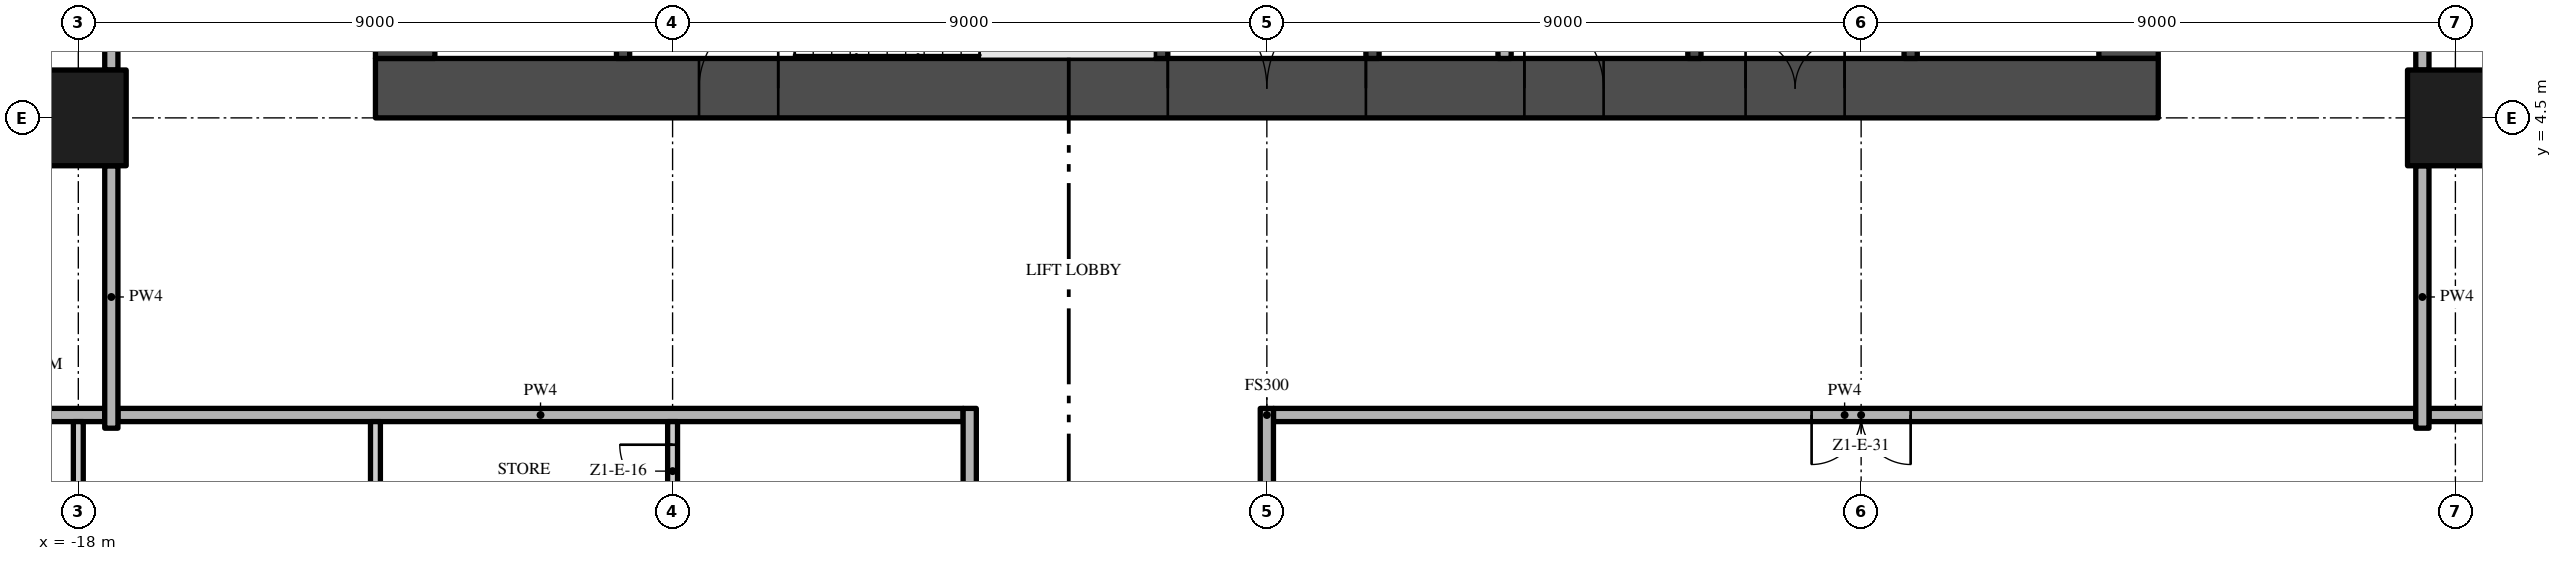
"""IFC4 building model, lengths in metres.
Left out: names, types, materials, properties, quantities, classifications, styles, units other than length and angle.
Written with IfcOpenShell. Run it as: python <this file> out.ifc"""

import sys

from ifc_helpers import new_model, si_unit, direction, frame, frame_2d, origin, origin_2d, place, context, subcontext, project, spatial, rectangle, extrude, element, fill, save


model = new_model("IFC4")
c1 = context("Model", 3, precision=1e-05, world=origin(), true_north=direction((0.0, 1.0)))
c2 = subcontext(c1, "Body", "Model", "MODEL_VIEW")
j1 = project(units=[si_unit("LENGTHUNIT", "METRE"), si_unit("PLANEANGLEUNIT", "RADIAN")], contexts=[c1])
p1 = place(None, origin())
s1 = spatial("IfcSite", under=j1, at=p1, CompositionType="ELEMENT")
p2 = place(p1, origin())
s2 = spatial("IfcBuilding", under=s1, at=p2, CompositionType="ELEMENT")
p3 = place(p2, frame((0.0, 0.0, 60.6)))
s3 = spatial("IfcBuildingStorey", under=s2, at=p3, CompositionType="ELEMENT", Elevation=60.6)
p4 = place(p3, frame((-13.5, 4.95, -0.3), z_axis=(0.0, 0.0, 1.0), x_axis=(1.0, 0.0, 0.0)))
e1 = element("IfcWall", 1, at=p4, inside=s3, PredefinedType="SHEAR", context=c2, shape_type="SweptSolid", body=[
    extrude(rectangle(XDim=27.0, YDim=0.9, at=frame_2d((13.5, 0.0))), origin(), (0.0, 0.0, 1.0), 3.8),
])
p5 = place(p4, frame((12.0, 0.0, 0.3)))
e2 = element("IfcOpeningElement", 2, at=p5, cuts=e1, PredefinedType="OPENING", context=c2, shape_type="SweptSolid", body=[
    extrude(rectangle(XDim=3.0, YDim=2.4, at=frame_2d((1.5, 1.2))), frame((0.0, 0.46, 0.0), z_axis=(0.0, -1.0, 0.0), x_axis=(1.0, 0.0, 0.0)), (0.0, 0.0, 1.0), 0.92),
])
p6 = place(p4, frame((4.9, 0.0, 0.3)))
e3 = element("IfcOpeningElement", 3, at=p6, cuts=e1, PredefinedType="OPENING", context=c2, shape_type="SweptSolid", body=[
    extrude(rectangle(XDim=1.2, YDim=2.2, at=frame_2d((0.6, 1.1))), frame((0.0, 0.46, 0.0), z_axis=(0.0, -1.0, 0.0), x_axis=(1.0, 0.0, 0.0)), (0.0, 0.0, 1.0), 0.92),
])
p7 = place(p4, frame((20.75, 0.0, 0.3)))
e4 = element("IfcOpeningElement", 4, at=p7, cuts=e1, PredefinedType="OPENING", context=c2, shape_type="SweptSolid", body=[
    extrude(rectangle(XDim=1.5, YDim=2.2, at=frame_2d((0.75, 1.1))), frame((0.0, 0.46, 0.0), z_axis=(0.0, -1.0, 0.0), x_axis=(1.0, 0.0, 0.0)), (0.0, 0.0, 1.0), 0.92),
])
p8 = place(p4, frame((17.4, 0.0, 0.3)))
e5 = element("IfcOpeningElement", 5, at=p8, cuts=e1, PredefinedType="OPENING", context=c2, shape_type="SweptSolid", body=[
    extrude(rectangle(XDim=1.2, YDim=2.2, at=frame_2d((0.6, 1.1))), frame((0.0, 0.46, 0.0), z_axis=(0.0, -1.0, 0.0), x_axis=(1.0, 0.0, 0.0)), (0.0, 0.0, 1.0), 0.92),
])
p9 = place(p3, frame((13.05, 5.4, -0.3), z_axis=(0.0, 0.0, 1.0), x_axis=(0.0, 1.0, 0.0)))
e6 = element("IfcWall", 6, at=p9, inside=s3, PredefinedType="SHEAR", context=c2, shape_type="SweptSolid", body=[
    extrude(rectangle(XDim=16.2, YDim=0.9, at=frame_2d((8.1, 0.0))), origin(), (0.0, 0.0, 1.0), 3.8),
])
p10 = place(p9, frame((6.0, 0.0, 0.3)))
e7 = element("IfcOpeningElement", 7, at=p10, cuts=e6, PredefinedType="OPENING", context=c2, shape_type="SweptSolid", body=[
    extrude(rectangle(XDim=1.2, YDim=2.2, at=frame_2d((0.6, 1.1))), frame((0.0, 0.46, 0.0), z_axis=(0.0, -1.0, 0.0), x_axis=(1.0, 0.0, 0.0)), (0.0, 0.0, 1.0), 0.92),
])
p11 = place(p3, frame((-13.05, 21.6, -0.3), z_axis=(0.0, 0.0, 1.0), x_axis=(0.0, -1.0, 0.0)))
e8 = element("IfcWall", 8, at=p11, inside=s3, PredefinedType="SHEAR", context=c2, shape_type="SweptSolid", body=[
    extrude(rectangle(XDim=16.2, YDim=0.9, at=frame_2d((8.1, 0.0))), origin(), (0.0, 0.0, 1.0), 3.8),
])
p12 = place(p11, frame((9.0, 0.0, 0.3)))
e9 = element("IfcOpeningElement", 9, at=p12, cuts=e8, PredefinedType="OPENING", context=c2, shape_type="SweptSolid", body=[
    extrude(rectangle(XDim=1.2, YDim=2.2, at=frame_2d((0.6, 1.1))), frame((0.0, 0.46, 0.0), z_axis=(0.0, -1.0, 0.0), x_axis=(1.0, 0.0, 0.0)), (0.0, 0.0, 1.0), 0.92),
])
for number, where, z_axis, x_axis in (
    (10, (-18.0, 4.5, 0.0), (0.0, 0.0, 1.0), (1.0, 0.0, 0.0)),
    (11, (18.0, 4.5, 0.0), (0.0, 0.0, 1.0), (1.0, 0.0, 0.0)),
):
    element("IfcColumn", number, at=place(p3, frame(where, z_axis=z_axis, x_axis=x_axis)), inside=s3, PredefinedType="COLUMN", context=c2, shape_type="SweptSolid", body=[
        extrude(rectangle(XDim=1.45, YDim=1.45, at=origin_2d()), origin(), (0.0, 0.0, 1.0), 3.5),
    ])
for number, where, z_axis, x_axis in (
    (12, (-9.75, 5.4, 0.0), (0.0, 0.0, 1.0), (0.0, 1.0, 0.0)),
    (13, (-1.6, 5.4, 0.0), (0.0, 0.0, 1.0), (0.0, 1.0, 0.0)),
):
    element("IfcWall", number, at=place(p3, frame(where, z_axis=z_axis, x_axis=x_axis)), inside=s3, PredefinedType="SHEAR", context=c2, shape_type="SweptSolid", body=[
        extrude(rectangle(XDim=2.55, YDim=0.2, at=frame_2d((1.275, 0.0))), origin(), (0.0, 0.0, 1.0), 3.5),
    ])
p13 = place(p3, frame((1.6, 13.5, 0.0), z_axis=(0.0, 0.0, 1.0), x_axis=(0.0, -1.0, 0.0)))
e14 = element("IfcWall", 14, at=p13, inside=s3, PredefinedType="SHEAR", context=c2, shape_type="SweptSolid", body=[
    extrude(rectangle(XDim=8.1, YDim=0.2, at=frame_2d((4.05, 0.0))), origin(), (0.0, 0.0, 1.0), 3.5),
])
p14 = place(p13, frame((3.2, 0.0, 0.0)))
e15 = element("IfcOpeningElement", 15, at=p14, cuts=e14, PredefinedType="OPENING", context=c2, shape_type="SweptSolid", body=[
    extrude(rectangle(XDim=0.9, YDim=2.1, at=frame_2d((0.45, 1.05))), frame((0.0, 0.11, 0.0), z_axis=(0.0, -1.0, 0.0), x_axis=(1.0, 0.0, 0.0)), (0.0, 0.0, 1.0), 0.22),
])
p15 = place(p3, frame((3.6, 13.5, 0.0), z_axis=(0.0, 0.0, 1.0), x_axis=(0.0, -1.0, 0.0)))
e16 = element("IfcWall", 16, at=p15, inside=s3, PredefinedType="PARTITIONING", context=c2, shape_type="SweptSolid", body=[
    extrude(rectangle(XDim=8.1, YDim=0.2, at=frame_2d((4.05, 0.0))), origin(), (0.0, 0.0, 1.0), 3.5),
])
p16 = place(p15, frame((3.6, 0.0, 0.0)))
e17 = element("IfcOpeningElement", 17, at=p16, cuts=e16, PredefinedType="OPENING", context=c2, shape_type="SweptSolid", body=[
    extrude(rectangle(XDim=0.9, YDim=2.1, at=frame_2d((0.45, 1.05))), frame((0.0, 0.11, 0.0), z_axis=(0.0, -1.0, 0.0), x_axis=(1.0, 0.0, 0.0)), (0.0, 0.0, 1.0), 0.22),
])
p17 = place(p3, frame((6.475, 5.4, 0.0), z_axis=(0.0, 0.0, 1.0), x_axis=(0.0, 1.0, 0.0)))
e18 = element("IfcWall", 18, at=p17, inside=s3, PredefinedType="SHEAR", context=c2, shape_type="SweptSolid", body=[
    extrude(rectangle(XDim=6.7, YDim=0.2, at=frame_2d((3.35, 0.0))), origin(), (0.0, 0.0, 1.0), 3.5),
])
p18 = place(p3, frame((9.75, 5.4, 0.0), z_axis=(0.0, 0.0, 1.0), x_axis=(0.0, 1.0, 0.0)))
e19 = element("IfcWall", 19, at=p18, inside=s3, PredefinedType="SHEAR", context=c2, shape_type="SweptSolid", body=[
    extrude(rectangle(XDim=2.2, YDim=0.2, at=frame_2d((1.1, 0.0))), origin(), (0.0, 0.0, 1.0), 3.5),
])
p19 = place(p18, frame((0.55, 0.0, 0.0)))
e20 = element("IfcOpeningElement", 20, at=p19, cuts=e19, PredefinedType="OPENING", context=c2, shape_type="SweptSolid", body=[
    extrude(rectangle(XDim=1.1, YDim=2.1, at=frame_2d((0.55, 1.05))), frame((0.0, 0.11, 0.0), z_axis=(0.0, -1.0, 0.0), x_axis=(1.0, 0.0, 0.0)), (0.0, 0.0, 1.0), 0.22),
])
p20 = place(p3, frame((-17.4, 0.0, 0.0), z_axis=(0.0, 0.0, 1.0), x_axis=(1.0, 0.0, 0.0)))
e21 = element("IfcWall", 21, at=p20, inside=s3, PredefinedType="PARTITIONING", context=c2, shape_type="SweptSolid", body=[
    extrude(rectangle(XDim=12.8, YDim=0.2, at=frame_2d((6.4, 0.0))), origin(), (0.0, 0.0, 1.0), 3.5),
])
p21 = place(p3, frame((17.4, 0.0, 0.0), z_axis=(0.0, 0.0, 1.0), x_axis=(-1.0, 0.0, 0.0)))
e22 = element("IfcWall", 22, at=p21, inside=s3, PredefinedType="PARTITIONING", context=c2, shape_type="SweptSolid", body=[
    extrude(rectangle(XDim=17.3, YDim=0.2, at=frame_2d((8.65, 0.0))), origin(), (0.0, 0.0, 1.0), 3.5),
])
p22 = place(p21, frame((7.65, 0.0, 0.0)))
e23 = element("IfcOpeningElement", 23, at=p22, cuts=e22, PredefinedType="OPENING", context=c2, shape_type="SweptSolid", body=[
    extrude(rectangle(XDim=1.5, YDim=2.4, at=frame_2d((0.75, 1.2))), frame((0.0, 0.11, 0.0), z_axis=(0.0, -1.0, 0.0), x_axis=(1.0, 0.0, 0.0)), (0.0, 0.0, 1.0), 0.22),
])
for number, where, z_axis, x_axis in (
    (24, (-26.7, 0.0, 0.0), (0.0, 0.0, 1.0), (1.0, 0.0, 0.0)),
    (25, (17.6, 0.0, 0.0), (0.0, 0.0, 1.0), (1.0, 0.0, 0.0)),
):
    element("IfcWall", number, at=place(p3, frame(where, z_axis=z_axis, x_axis=x_axis)), inside=s3, PredefinedType="PARTITIONING", context=c2, shape_type="SweptSolid", body=[
        extrude(rectangle(XDim=9.1, YDim=0.2, at=frame_2d((4.55, 0.0))), origin(), (0.0, 0.0, 1.0), 3.5),
    ])
p23 = place(p3, frame((-18.0, -3.775, 0.0), z_axis=(0.0, 0.0, 1.0), x_axis=(0.0, 1.0, 0.0)))
e26 = element("IfcWall", 26, at=p23, inside=s3, PredefinedType="PARTITIONING", context=c2, shape_type="SweptSolid", body=[
    extrude(rectangle(XDim=3.675, YDim=0.15, at=frame_2d((1.837, 0.0))), origin(), (0.0, 0.0, 1.0), 3.5),
])
p24 = place(p23, frame((0.15, 0.0, 0.0)))
e27 = element("IfcOpeningElement", 27, at=p24, cuts=e26, PredefinedType="OPENING", context=c2, shape_type="SweptSolid", body=[
    extrude(rectangle(XDim=1.0, YDim=2.4, at=frame_2d((0.5, 1.2))), frame((0.0, 0.085, 0.0), z_axis=(0.0, -1.0, 0.0), x_axis=(1.0, 0.0, 0.0)), (0.0, 0.0, 1.0), 0.17),
])
p25 = place(p3, frame((-17.5, -0.2, 0.0), z_axis=(0.0, 0.0, 1.0), x_axis=(0.0, 1.0, 0.0)))
e28 = element("IfcWall", 28, at=p25, inside=s3, PredefinedType="PARTITIONING", context=c2, shape_type="SweptSolid", body=[
    extrude(rectangle(XDim=3.975, YDim=0.2, at=frame_2d((1.988, 0.0))), origin(), (0.0, 0.0, 1.0), 3.5),
])
p26 = place(p3, frame((-17.5, 5.225, 0.0), z_axis=(0.0, 0.0, 1.0), x_axis=(0.0, 1.0, 0.0)))
e29 = element("IfcWall", 29, at=p26, inside=s3, PredefinedType="PARTITIONING", context=c2, shape_type="SweptSolid", body=[
    extrude(rectangle(XDim=7.55, YDim=0.2, at=frame_2d((3.775, 0.0))), origin(), (0.0, 0.0, 1.0), 3.5),
])
p27 = place(p3, frame((-13.5, -9.975, 0.0), z_axis=(0.0, 0.0, 1.0), x_axis=(0.0, 1.0, 0.0)))
e30 = element("IfcWall", 30, at=p27, inside=s3, PredefinedType="PARTITIONING", context=c2, shape_type="SweptSolid", body=[
    extrude(rectangle(XDim=9.875, YDim=0.15, at=frame_2d((4.938, 0.0))), origin(), (0.0, 0.0, 1.0), 3.5),
])
p28 = place(p3, frame((-9.0, -3.775, 0.0), z_axis=(0.0, 0.0, 1.0), x_axis=(0.0, 1.0, 0.0)))
e31 = element("IfcWall", 31, at=p28, inside=s3, PredefinedType="PARTITIONING", context=c2, shape_type="SweptSolid", body=[
    extrude(rectangle(XDim=3.675, YDim=0.15, at=frame_2d((1.837, 0.0))), origin(), (0.0, 0.0, 1.0), 3.5),
])
p29 = place(p28, frame((2.525, 0.0, 0.0)))
e32 = element("IfcOpeningElement", 32, at=p29, cuts=e31, PredefinedType="OPENING", context=c2, shape_type="SweptSolid", body=[
    extrude(rectangle(XDim=0.8, YDim=2.0, at=frame_2d((0.4, 1.0))), frame((0.0, 0.085, 0.0), z_axis=(0.0, -1.0, 0.0), x_axis=(1.0, 0.0, 0.0)), (0.0, 0.0, 1.0), 0.17),
])
p30 = place(p3, frame((-4.5, -22.2, 0.0), z_axis=(0.0, 0.0, 1.0), x_axis=(0.0, 1.0, 0.0)))
e33 = element("IfcWall", 33, at=p30, inside=s3, PredefinedType="PARTITIONING", context=c2, shape_type="SweptSolid", body=[
    extrude(rectangle(XDim=22.3, YDim=0.2, at=frame_2d((11.15, 0.0))), origin(), (0.0, 0.0, 1.0), 3.5),
])
p31 = place(p30, frame((10.2, 0.0, 0.0)))
e34 = element("IfcOpeningElement", 34, at=p31, cuts=e33, PredefinedType="OPENING", context=c2, shape_type="SweptSolid", body=[
    extrude(rectangle(XDim=1.5, YDim=2.4, at=frame_2d((0.75, 1.2))), frame((0.0, 0.11, 0.0), z_axis=(0.0, -1.0, 0.0), x_axis=(1.0, 0.0, 0.0)), (0.0, 0.0, 1.0), 0.22),
])
p32 = place(p3, frame((0.0, -3.775, 0.0), z_axis=(0.0, 0.0, 1.0), x_axis=(0.0, 1.0, 0.0)))
e35 = element("IfcWall", 35, at=p32, inside=s3, PredefinedType="PARTITIONING", context=c2, shape_type="SweptSolid", body=[
    extrude(rectangle(XDim=3.875, YDim=0.2, at=frame_2d((1.938, 0.0))), origin(), (0.0, 0.0, 1.0), 3.5),
])
p33 = place(p3, frame((17.5, -0.2, 0.0), z_axis=(0.0, 0.0, 1.0), x_axis=(0.0, 1.0, 0.0)))
e36 = element("IfcWall", 36, at=p33, inside=s3, PredefinedType="PARTITIONING", context=c2, shape_type="SweptSolid", body=[
    extrude(rectangle(XDim=3.975, YDim=0.2, at=frame_2d((1.988, 0.0))), origin(), (0.0, 0.0, 1.0), 3.5),
])
p34 = place(p3, frame((17.5, 12.775, 0.0), z_axis=(0.0, 0.0, 1.0), x_axis=(0.0, -1.0, 0.0)))
e37 = element("IfcWall", 37, at=p34, inside=s3, PredefinedType="PARTITIONING", context=c2, shape_type="SweptSolid", body=[
    extrude(rectangle(XDim=7.55, YDim=0.2, at=frame_2d((3.775, 0.0))), origin(), (0.0, 0.0, 1.0), 3.5),
])
p35 = place(p34, frame((5.4, 0.0, 0.0)))
e38 = element("IfcOpeningElement", 38, at=p35, cuts=e37, PredefinedType="OPENING", context=c2, shape_type="SweptSolid", body=[
    extrude(rectangle(XDim=1.2, YDim=2.4, at=frame_2d((0.6, 1.2))), frame((0.0, 0.11, 0.0), z_axis=(0.0, -1.0, 0.0), x_axis=(1.0, 0.0, 0.0)), (0.0, 0.0, 1.0), 0.22),
])
p36 = place(p5, frame((3.0, 0.0, 0.0), z_axis=(0.0, 0.0, 1.0), x_axis=(-1.0, 0.0, 0.0)))
e39 = element("IfcDoor", 39, at=p36, inside=s3, OperationType="DOUBLE_DOOR_SINGLE_SWING", PredefinedType="DOOR", context=c2, shape_type="SweptSolid", body=[
    extrude(rectangle(XDim=3.0, YDim=2.4, at=frame_2d((1.5, 1.2))), frame((0.0, 0.025, 0.0), z_axis=(0.0, -1.0, 0.0), x_axis=(1.0, 0.0, 0.0)), (0.0, 0.0, 1.0), 0.05),
])
fill(e2, e39)
p37 = place(p6, frame((1.2, 0.0, 0.0), z_axis=(0.0, 0.0, 1.0), x_axis=(-1.0, 0.0, 0.0)))
e40 = element("IfcDoor", 40, at=p37, inside=s3, OperationType="SINGLE_SWING_LEFT", PredefinedType="DOOR", context=c2, shape_type="SweptSolid", body=[
    extrude(rectangle(XDim=1.2, YDim=2.2, at=frame_2d((0.6, 1.1))), frame((0.0, 0.025, 0.0), z_axis=(0.0, -1.0, 0.0), x_axis=(1.0, 0.0, 0.0)), (0.0, 0.0, 1.0), 0.05),
])
fill(e3, e40)
p38 = place(p7, frame((1.5, 0.0, 0.0), z_axis=(0.0, 0.0, 1.0), x_axis=(-1.0, 0.0, 0.0)))
e41 = element("IfcDoor", 41, at=p38, inside=s3, OperationType="DOUBLE_DOOR_SINGLE_SWING", PredefinedType="DOOR", context=c2, shape_type="SweptSolid", body=[
    extrude(rectangle(XDim=1.5, YDim=2.2, at=frame_2d((0.75, 1.1))), frame((0.0, 0.025, 0.0), z_axis=(0.0, -1.0, 0.0), x_axis=(1.0, 0.0, 0.0)), (0.0, 0.0, 1.0), 0.05),
])
fill(e4, e41)
p39 = place(p8, frame((1.2, 0.0, 0.0), z_axis=(0.0, 0.0, 1.0), x_axis=(-1.0, 0.0, 0.0)))
e42 = element("IfcDoor", 42, at=p39, inside=s3, OperationType="SINGLE_SWING_RIGHT", PredefinedType="DOOR", context=c2, shape_type="SweptSolid", body=[
    extrude(rectangle(XDim=1.2, YDim=2.2, at=frame_2d((0.6, 1.1))), frame((0.0, 0.025, 0.0), z_axis=(0.0, -1.0, 0.0), x_axis=(1.0, 0.0, 0.0)), (0.0, 0.0, 1.0), 0.05),
])
fill(e5, e42)
p40 = place(p29, origin())
e43 = element("IfcDoor", 43, at=p40, inside=s3, OperationType="SINGLE_SWING_RIGHT", PredefinedType="DOOR", context=c2, shape_type="SweptSolid", body=[
    extrude(rectangle(XDim=0.8, YDim=2.0, at=frame_2d((0.4, 1.0))), frame((0.0, 0.025, 0.0), z_axis=(0.0, -1.0, 0.0), x_axis=(1.0, 0.0, 0.0)), (0.0, 0.0, 1.0), 0.05),
])
fill(e32, e43)
p41 = place(p22, origin())
e44 = element("IfcDoor", 44, at=p41, inside=s3, OperationType="DOUBLE_DOOR_SINGLE_SWING", PredefinedType="DOOR", context=c2, shape_type="SweptSolid", body=[
    extrude(rectangle(XDim=1.5, YDim=2.4, at=frame_2d((0.75, 1.2))), frame((0.0, 0.025, 0.0), z_axis=(0.0, -1.0, 0.0), x_axis=(1.0, 0.0, 0.0)), (0.0, 0.0, 1.0), 0.05),
])
fill(e23, e44)
save(model, sys.argv[1])
